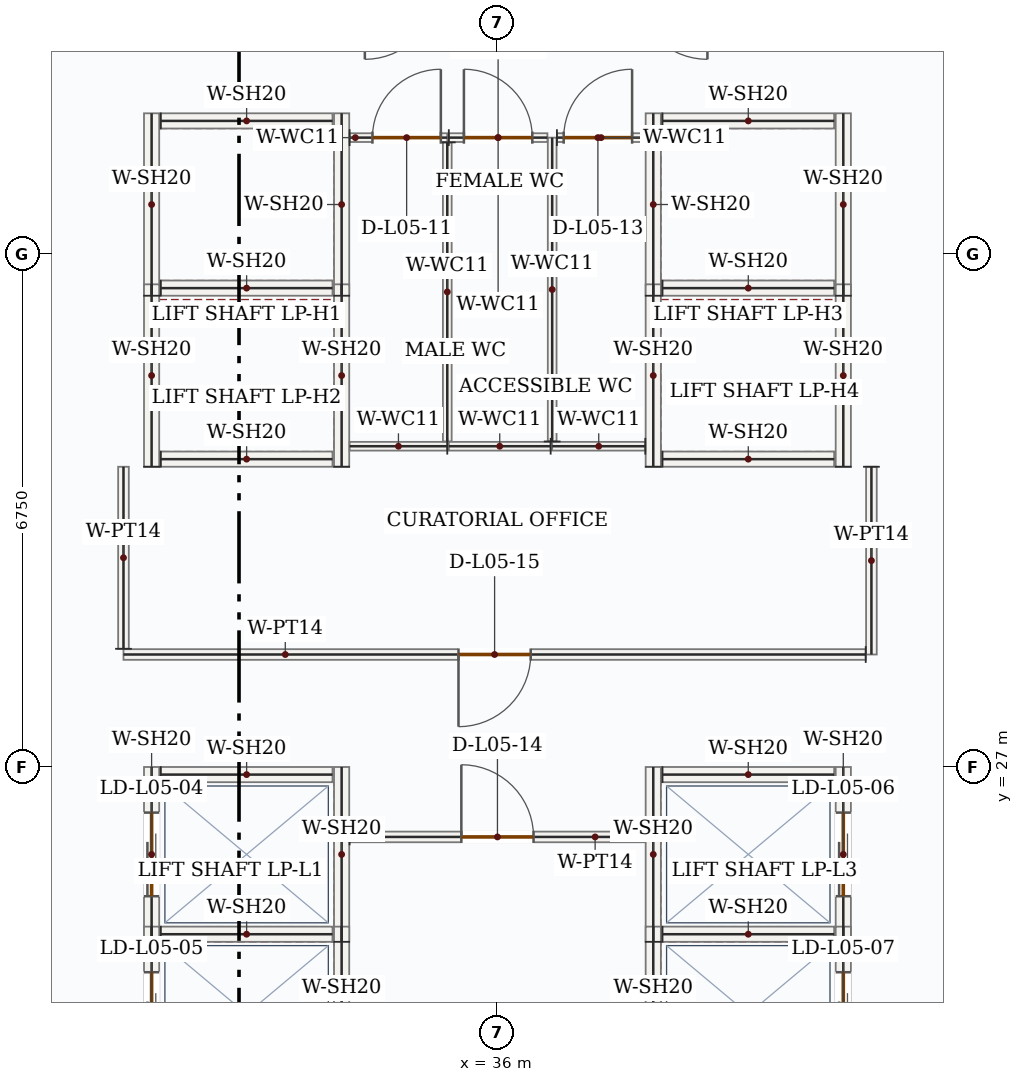
"""IFC4 building model, lengths in metres.
Left out: names, types, materials, properties, quantities, classifications, styles, units other than length and angle.
Written with IfcOpenShell. Run it as: python <this file> out.ifc"""

import sys

from ifc_helpers import new_model, si_unit, direction, frame, frame_2d, origin, place, context, subcontext, project, spatial, rectangle, extrude, source, transform, mapped, element, fill, save


model = new_model("IFC4")
c1 = context("Model", 3, precision=1e-05, world=origin(), true_north=direction((0.0, 1.0)))
c2 = subcontext(c1, "Body", "Model", "MODEL_VIEW")
j1 = project(units=[si_unit("LENGTHUNIT", "METRE"), si_unit("PLANEANGLEUNIT", "RADIAN")], contexts=[c1])
p1 = place(None, origin())
s1 = spatial("IfcSite", under=j1, at=p1, CompositionType="ELEMENT")
p2 = place(p1, origin())
s2 = spatial("IfcBuilding", under=s1, at=p2, CompositionType="ELEMENT")
p3 = place(p2, frame((0.0, 0.0, 29.1)))
s3 = spatial("IfcBuildingStorey", under=s2, at=p3, CompositionType="ELEMENT", Elevation=29.1)
m1 = source(origin(), c2, "Body", "SweptSolid", [
    extrude(rectangle(XDim=2.4, YDim=0.2, at=frame_2d((1.2, 0.0))), origin(), (0.0, 0.0, 1.0), 3.95),
])
for number, where, z_axis, x_axis in (
    (1, (31.45, 33.2, 0.0), (0.0, 0.0, 1.0), (0.0, 1.0, 0.0)),
    (2, (33.95, 33.2, 0.0), (0.0, 0.0, 1.0), (0.0, 1.0, 0.0)),
):
    element("IfcWall", number, at=place(p3, frame(where, z_axis=z_axis, x_axis=x_axis)), inside=s3, PredefinedType="SOLIDWALL", context=c2, shape_type="MappedRepresentation", body=[
        mapped(m1, transform((0.0, 0.0, 0.0), x_axis=(1.0, 0.0, 0.0), y_axis=(0.0, 1.0, 0.0), z_axis=(0.0, 0.0, 1.0), scale=1.0)),
    ])
m2 = source(origin(), c2, "Body", "SweptSolid", [
    extrude(rectangle(XDim=2.26, YDim=0.2, at=frame_2d((1.13, 0.0))), origin(), (0.0, 0.0, 1.0), 3.95),
])
for number, where, z_axis, x_axis in (
    (3, (31.57, 33.3, 0.0), (0.0, 0.0, 1.0), (1.0, 0.0, 0.0)),
    (4, (31.57, 35.5, 0.0), (0.0, 0.0, 1.0), (1.0, 0.0, 0.0)),
):
    element("IfcWall", number, at=place(p3, frame(where, z_axis=z_axis, x_axis=x_axis)), inside=s3, PredefinedType="SOLIDWALL", context=c2, shape_type="MappedRepresentation", body=[
        mapped(m2, transform((0.0, 0.0, 0.0), x_axis=(1.0, 0.0, 0.0), y_axis=(0.0, 1.0, 0.0), z_axis=(0.0, 0.0, 1.0), scale=1.0)),
    ])
for number, where, z_axis, x_axis in (
    (5, (31.45, 30.95, 0.0), (0.0, 0.0, 1.0), (0.0, 1.0, 0.0)),
    (6, (33.95, 30.95, 0.0), (0.0, 0.0, 1.0), (0.0, 1.0, 0.0)),
):
    element("IfcWall", number, at=place(p3, frame(where, z_axis=z_axis, x_axis=x_axis)), inside=s3, PredefinedType="SOLIDWALL", context=c2, shape_type="MappedRepresentation", body=[
        mapped(m1, transform((0.0, 0.0, 0.0), x_axis=(1.0, 0.0, 0.0), y_axis=(0.0, 1.0, 0.0), z_axis=(0.0, 0.0, 1.0), scale=1.0)),
    ])
p4 = place(p3, frame((31.57, 31.05, 0.0), z_axis=(0.0, 0.0, 1.0), x_axis=(1.0, 0.0, 0.0)))
e7 = element("IfcWall", 7, at=p4, inside=s3, PredefinedType="SOLIDWALL", context=c2, shape_type="MappedRepresentation", body=[
    mapped(m2, transform((0.0, 0.0, 0.0), x_axis=(1.0, 0.0, 0.0), y_axis=(0.0, 1.0, 0.0), z_axis=(0.0, 0.0, 1.0), scale=1.0)),
])
for number, where, z_axis, x_axis in (
    (8, (38.05, 33.2, 0.0), (0.0, 0.0, 1.0), (0.0, 1.0, 0.0)),
    (9, (40.55, 33.2, 0.0), (0.0, 0.0, 1.0), (0.0, 1.0, 0.0)),
):
    element("IfcWall", number, at=place(p3, frame(where, z_axis=z_axis, x_axis=x_axis)), inside=s3, PredefinedType="SOLIDWALL", context=c2, shape_type="MappedRepresentation", body=[
        mapped(m1, transform((0.0, 0.0, 0.0), x_axis=(1.0, 0.0, 0.0), y_axis=(0.0, 1.0, 0.0), z_axis=(0.0, 0.0, 1.0), scale=1.0)),
    ])
for number, where, z_axis, x_axis in (
    (10, (38.17, 33.3, 0.0), (0.0, 0.0, 1.0), (1.0, 0.0, 0.0)),
    (11, (38.17, 35.5, 0.0), (0.0, 0.0, 1.0), (1.0, 0.0, 0.0)),
):
    element("IfcWall", number, at=place(p3, frame(where, z_axis=z_axis, x_axis=x_axis)), inside=s3, PredefinedType="SOLIDWALL", context=c2, shape_type="MappedRepresentation", body=[
        mapped(m2, transform((0.0, 0.0, 0.0), x_axis=(1.0, 0.0, 0.0), y_axis=(0.0, 1.0, 0.0), z_axis=(0.0, 0.0, 1.0), scale=1.0)),
    ])
for number, where, z_axis, x_axis in (
    (12, (38.05, 30.95, 0.0), (0.0, 0.0, 1.0), (0.0, 1.0, 0.0)),
    (13, (40.55, 30.95, 0.0), (0.0, 0.0, 1.0), (0.0, 1.0, 0.0)),
):
    element("IfcWall", number, at=place(p3, frame(where, z_axis=z_axis, x_axis=x_axis)), inside=s3, PredefinedType="SOLIDWALL", context=c2, shape_type="MappedRepresentation", body=[
        mapped(m1, transform((0.0, 0.0, 0.0), x_axis=(1.0, 0.0, 0.0), y_axis=(0.0, 1.0, 0.0), z_axis=(0.0, 0.0, 1.0), scale=1.0)),
    ])
p5 = place(p3, frame((38.17, 31.05, 0.0), z_axis=(0.0, 0.0, 1.0), x_axis=(1.0, 0.0, 0.0)))
e14 = element("IfcWall", 14, at=p5, inside=s3, PredefinedType="SOLIDWALL", context=c2, shape_type="MappedRepresentation", body=[
    mapped(m2, transform((0.0, 0.0, 0.0), x_axis=(1.0, 0.0, 0.0), y_axis=(0.0, 1.0, 0.0), z_axis=(0.0, 0.0, 1.0), scale=1.0)),
])
p6 = place(p3, frame((31.45, 24.7, 0.0), z_axis=(0.0, 0.0, 1.0), x_axis=(0.0, 1.0, 0.0)))
e15 = element("IfcWall", 15, at=p6, inside=s3, PredefinedType="SOLIDWALL", context=c2, shape_type="SweptSolid", body=[
    extrude(rectangle(XDim=2.3, YDim=0.2, at=frame_2d((1.15, 0.0))), origin(), (0.0, 0.0, 1.0), 3.95),
])
p7 = place(p6, frame((0.6, 0.0, 0.0)))
e16 = element("IfcOpeningElement", 16, at=p7, cuts=e15, PredefinedType="OPENING", context=c2, shape_type="SweptSolid", body=[
    extrude(rectangle(XDim=1.1, YDim=2.15, at=frame_2d((0.55, 1.075))), frame((0.0, 0.11, 0.0), z_axis=(0.0, -1.0, 0.0), x_axis=(1.0, 0.0, 0.0)), (0.0, 0.0, 1.0), 0.22),
])
m3 = source(origin(), c2, "Body", "SweptSolid", [
    extrude(rectangle(XDim=2.3, YDim=0.2, at=frame_2d((1.15, 0.0))), origin(), (0.0, 0.0, 1.0), 3.95),
])
p8 = place(p3, frame((33.95, 24.7, 0.0), z_axis=(0.0, 0.0, 1.0), x_axis=(0.0, 1.0, 0.0)))
e17 = element("IfcWall", 17, at=p8, inside=s3, PredefinedType="SOLIDWALL", context=c2, shape_type="MappedRepresentation", body=[
    mapped(m3, transform((0.0, 0.0, 0.0), x_axis=(1.0, 0.0, 0.0), y_axis=(0.0, 1.0, 0.0), z_axis=(0.0, 0.0, 1.0), scale=1.0)),
])
for number, where, z_axis, x_axis in (
    (18, (31.57, 24.8, 0.0), (0.0, 0.0, 1.0), (1.0, 0.0, 0.0)),
    (19, (31.57, 26.9, 0.0), (0.0, 0.0, 1.0), (1.0, 0.0, 0.0)),
):
    element("IfcWall", number, at=place(p3, frame(where, z_axis=z_axis, x_axis=x_axis)), inside=s3, PredefinedType="SOLIDWALL", context=c2, shape_type="MappedRepresentation", body=[
        mapped(m2, transform((0.0, 0.0, 0.0), x_axis=(1.0, 0.0, 0.0), y_axis=(0.0, 1.0, 0.0), z_axis=(0.0, 0.0, 1.0), scale=1.0)),
    ])
p9 = place(p3, frame((31.45, 22.6, 0.0), z_axis=(0.0, 0.0, 1.0), x_axis=(0.0, 1.0, 0.0)))
e20 = element("IfcWall", 20, at=p9, inside=s3, PredefinedType="SOLIDWALL", context=c2, shape_type="SweptSolid", body=[
    extrude(rectangle(XDim=2.3, YDim=0.2, at=frame_2d((1.15, 0.0))), origin(), (0.0, 0.0, 1.0), 3.95),
])
p10 = place(p9, frame((0.6, 0.0, 0.0)))
e21 = element("IfcOpeningElement", 21, at=p10, cuts=e20, PredefinedType="OPENING", context=c2, shape_type="SweptSolid", body=[
    extrude(rectangle(XDim=1.1, YDim=2.15, at=frame_2d((0.55, 1.075))), frame((0.0, 0.11, 0.0), z_axis=(0.0, -1.0, 0.0), x_axis=(1.0, 0.0, 0.0)), (0.0, 0.0, 1.0), 0.22),
])
m4 = source(origin(), c2, "Body", "SweptSolid", [
    extrude(rectangle(XDim=2.3, YDim=0.2, at=frame_2d((1.15, 0.0))), origin(), (0.0, 0.0, 1.0), 3.95),
])
p11 = place(p3, frame((33.95, 22.6, 0.0), z_axis=(0.0, 0.0, 1.0), x_axis=(0.0, 1.0, 0.0)))
e22 = element("IfcWall", 22, at=p11, inside=s3, PredefinedType="SOLIDWALL", context=c2, shape_type="MappedRepresentation", body=[
    mapped(m4, transform((0.0, 0.0, 0.0), x_axis=(1.0, 0.0, 0.0), y_axis=(0.0, 1.0, 0.0), z_axis=(0.0, 0.0, 1.0), scale=1.0)),
])
p12 = place(p3, frame((38.05, 24.7, 0.0), z_axis=(0.0, 0.0, 1.0), x_axis=(0.0, 1.0, 0.0)))
e23 = element("IfcWall", 23, at=p12, inside=s3, PredefinedType="SOLIDWALL", context=c2, shape_type="MappedRepresentation", body=[
    mapped(m3, transform((0.0, 0.0, 0.0), x_axis=(1.0, 0.0, 0.0), y_axis=(0.0, 1.0, 0.0), z_axis=(0.0, 0.0, 1.0), scale=1.0)),
])
p13 = place(p3, frame((40.55, 24.7, 0.0), z_axis=(0.0, 0.0, 1.0), x_axis=(0.0, 1.0, 0.0)))
e24 = element("IfcWall", 24, at=p13, inside=s3, PredefinedType="SOLIDWALL", context=c2, shape_type="SweptSolid", body=[
    extrude(rectangle(XDim=2.3, YDim=0.2, at=frame_2d((1.15, 0.0))), origin(), (0.0, 0.0, 1.0), 3.95),
])
p14 = place(p13, frame((0.6, 0.0, 0.0)))
e25 = element("IfcOpeningElement", 25, at=p14, cuts=e24, PredefinedType="OPENING", context=c2, shape_type="SweptSolid", body=[
    extrude(rectangle(XDim=1.1, YDim=2.15, at=frame_2d((0.55, 1.075))), frame((0.0, 0.11, 0.0), z_axis=(0.0, -1.0, 0.0), x_axis=(1.0, 0.0, 0.0)), (0.0, 0.0, 1.0), 0.22),
])
for number, where, z_axis, x_axis in (
    (26, (38.17, 24.8, 0.0), (0.0, 0.0, 1.0), (1.0, 0.0, 0.0)),
    (27, (38.17, 26.9, 0.0), (0.0, 0.0, 1.0), (1.0, 0.0, 0.0)),
):
    element("IfcWall", number, at=place(p3, frame(where, z_axis=z_axis, x_axis=x_axis)), inside=s3, PredefinedType="SOLIDWALL", context=c2, shape_type="MappedRepresentation", body=[
        mapped(m2, transform((0.0, 0.0, 0.0), x_axis=(1.0, 0.0, 0.0), y_axis=(0.0, 1.0, 0.0), z_axis=(0.0, 0.0, 1.0), scale=1.0)),
    ])
p15 = place(p3, frame((38.05, 22.6, 0.0), z_axis=(0.0, 0.0, 1.0), x_axis=(0.0, 1.0, 0.0)))
e28 = element("IfcWall", 28, at=p15, inside=s3, PredefinedType="SOLIDWALL", context=c2, shape_type="MappedRepresentation", body=[
    mapped(m4, transform((0.0, 0.0, 0.0), x_axis=(1.0, 0.0, 0.0), y_axis=(0.0, 1.0, 0.0), z_axis=(0.0, 0.0, 1.0), scale=1.0)),
])
p16 = place(p3, frame((40.55, 22.6, 0.0), z_axis=(0.0, 0.0, 1.0), x_axis=(0.0, 1.0, 0.0)))
e29 = element("IfcWall", 29, at=p16, inside=s3, PredefinedType="SOLIDWALL", context=c2, shape_type="SweptSolid", body=[
    extrude(rectangle(XDim=2.3, YDim=0.2, at=frame_2d((1.15, 0.0))), origin(), (0.0, 0.0, 1.0), 3.95),
])
p17 = place(p16, frame((0.6, 0.0, 0.0)))
e30 = element("IfcOpeningElement", 30, at=p17, cuts=e29, PredefinedType="OPENING", context=c2, shape_type="SweptSolid", body=[
    extrude(rectangle(XDim=1.1, YDim=2.15, at=frame_2d((0.55, 1.075))), frame((0.0, 0.11, 0.0), z_axis=(0.0, -1.0, 0.0), x_axis=(1.0, 0.0, 0.0)), (0.0, 0.0, 1.0), 0.22),
])
m5 = source(origin(), c2, "Body", "SweptSolid", [
    extrude(rectangle(XDim=1.225, YDim=0.115, at=frame_2d((0.613, 0.0))), origin(), (0.0, 0.0, 1.0), 3.95),
])
p18 = place(p3, frame((37.945, 31.22, 0.0), z_axis=(0.0, 0.0, 1.0), x_axis=(-1.0, 0.0, 0.0)))
e31 = element("IfcWall", 31, at=p18, inside=s3, PredefinedType="PARTITIONING", context=c2, shape_type="MappedRepresentation", body=[
    mapped(m5, transform((0.0, 0.0, 0.0), x_axis=(1.0, 0.0, 0.0), y_axis=(0.0, 1.0, 0.0), z_axis=(0.0, 0.0, 1.0), scale=1.0)),
])
m6 = source(origin(), c2, "Body", "SweptSolid", [
    extrude(rectangle(XDim=3.998, YDim=0.115, at=frame_2d((1.999, 0.0))), origin(), (0.0, 0.0, 1.0), 3.95),
])
p19 = place(p3, frame((36.72, 31.282, 0.0), z_axis=(0.0, 0.0, 1.0), x_axis=(0.0, 1.0, 0.0)))
e32 = element("IfcWall", 32, at=p19, inside=s3, PredefinedType="PARTITIONING", context=c2, shape_type="MappedRepresentation", body=[
    mapped(m6, transform((0.0, 0.0, 0.0), x_axis=(1.0, 0.0, 0.0), y_axis=(0.0, 1.0, 0.0), z_axis=(0.0, 0.0, 1.0), scale=1.0)),
])
p20 = place(p3, frame((36.782, 35.28, 0.0), z_axis=(0.0, 0.0, 1.0), x_axis=(1.0, 0.0, 0.0)))
e33 = element("IfcWall", 33, at=p20, inside=s3, PredefinedType="PARTITIONING", context=c2, shape_type="SweptSolid", body=[
    extrude(rectangle(XDim=1.163, YDim=0.115, at=frame_2d((0.581, 0.0))), origin(), (0.0, 0.0, 1.0), 3.95),
])
p21 = place(p20, frame((0.089, 0.0, 0.0)))
e34 = element("IfcOpeningElement", 34, at=p21, cuts=e33, PredefinedType="OPENING", context=c2, shape_type="SweptSolid", body=[
    extrude(rectangle(XDim=0.9, YDim=2.1, at=frame_2d((0.45, 1.05))), frame((0.0, 0.067, 0.0), z_axis=(0.0, -1.0, 0.0), x_axis=(1.0, 0.0, 0.0)), (0.0, 0.0, 1.0), 0.135),
])
m7 = source(origin(), c2, "Body", "SweptSolid", [
    extrude(rectangle(XDim=1.285, YDim=0.115, at=frame_2d((0.643, 0.0))), origin(), (0.0, 0.0, 1.0), 3.95),
])
p22 = place(p3, frame((35.34, 31.22, 0.0), z_axis=(0.0, 0.0, 1.0), x_axis=(-1.0, 0.0, 0.0)))
e35 = element("IfcWall", 35, at=p22, inside=s3, PredefinedType="PARTITIONING", context=c2, shape_type="MappedRepresentation", body=[
    mapped(m7, transform((0.0, 0.0, 0.0), x_axis=(1.0, 0.0, 0.0), y_axis=(0.0, 1.0, 0.0), z_axis=(0.0, 0.0, 1.0), scale=1.0)),
])
p23 = place(p3, frame((34.055, 35.28, 0.0), z_axis=(0.0, 0.0, 1.0), x_axis=(1.0, 0.0, 0.0)))
e36 = element("IfcWall", 36, at=p23, inside=s3, PredefinedType="PARTITIONING", context=c2, shape_type="SweptSolid", body=[
    extrude(rectangle(XDim=1.285, YDim=0.115, at=frame_2d((0.643, 0.0))), origin(), (0.0, 0.0, 1.0), 3.95),
])
p24 = place(p23, frame((0.3, 0.0, 0.0)))
e37 = element("IfcOpeningElement", 37, at=p24, cuts=e36, PredefinedType="OPENING", context=c2, shape_type="SweptSolid", body=[
    extrude(rectangle(XDim=0.9, YDim=2.1, at=frame_2d((0.45, 1.05))), frame((0.0, 0.067, 0.0), z_axis=(0.0, -1.0, 0.0), x_axis=(1.0, 0.0, 0.0)), (0.0, 0.0, 1.0), 0.135),
])
m8 = source(origin(), c2, "Body", "SweptSolid", [
    extrude(rectangle(XDim=3.935, YDim=0.115, at=frame_2d((1.968, 0.0))), origin(), (0.0, 0.0, 1.0), 3.95),
])
p25 = place(p3, frame((35.34, 35.218, 0.0), z_axis=(0.0, 0.0, 1.0), x_axis=(0.0, -1.0, 0.0)))
e38 = element("IfcWall", 38, at=p25, inside=s3, PredefinedType="PARTITIONING", context=c2, shape_type="MappedRepresentation", body=[
    mapped(m8, transform((0.0, 0.0, 0.0), x_axis=(1.0, 0.0, 0.0), y_axis=(0.0, 1.0, 0.0), z_axis=(0.0, 0.0, 1.0), scale=1.0)),
])
m9 = source(origin(), c2, "Body", "SweptSolid", [
    extrude(rectangle(XDim=1.34, YDim=0.115, at=frame_2d((0.67, 0.0))), origin(), (0.0, 0.0, 1.0), 3.95),
])
p26 = place(p3, frame((36.7, 31.22, 0.0), z_axis=(0.0, 0.0, 1.0), x_axis=(-1.0, 0.0, 0.0)))
e39 = element("IfcWall", 39, at=p26, inside=s3, PredefinedType="PARTITIONING", context=c2, shape_type="MappedRepresentation", body=[
    mapped(m9, transform((0.0, 0.0, 0.0), x_axis=(1.0, 0.0, 0.0), y_axis=(0.0, 1.0, 0.0), z_axis=(0.0, 0.0, 1.0), scale=1.0)),
])
p27 = place(p3, frame((35.36, 35.28, 0.0), z_axis=(0.0, 0.0, 1.0), x_axis=(1.0, 0.0, 0.0)))
e40 = element("IfcWall", 40, at=p27, inside=s3, PredefinedType="PARTITIONING", context=c2, shape_type="SweptSolid", body=[
    extrude(rectangle(XDim=1.297, YDim=0.115, at=frame_2d((0.649, 0.0))), origin(), (0.0, 0.0, 1.0), 3.95),
])
p28 = place(p27, frame((0.199, 0.0, 0.0)))
e41 = element("IfcOpeningElement", 41, at=p28, cuts=e40, PredefinedType="OPENING", context=c2, shape_type="SweptSolid", body=[
    extrude(rectangle(XDim=0.9, YDim=2.1, at=frame_2d((0.45, 1.05))), frame((0.0, 0.067, 0.0), z_axis=(0.0, -1.0, 0.0), x_axis=(1.0, 0.0, 0.0)), (0.0, 0.0, 1.0), 0.135),
])
p29 = place(p3, frame((34.055, 26.08, 0.0), z_axis=(0.0, 0.0, 1.0), x_axis=(1.0, 0.0, 0.0)))
e42 = element("IfcWall", 42, at=p29, inside=s3, PredefinedType="PARTITIONING", context=c2, shape_type="SweptSolid", body=[
    extrude(rectangle(XDim=3.89, YDim=0.14, at=frame_2d((1.945, 0.0))), origin(), (0.0, 0.0, 1.0), 3.95),
])
p30 = place(p29, frame((1.47, 0.0, 0.0)))
e43 = element("IfcOpeningElement", 43, at=p30, cuts=e42, PredefinedType="OPENING", context=c2, shape_type="SweptSolid", body=[
    extrude(rectangle(XDim=0.95, YDim=2.15, at=frame_2d((0.475, 1.075))), frame((0.0, 0.08, 0.0), z_axis=(0.0, -1.0, 0.0), x_axis=(1.0, 0.0, 0.0)), (0.0, 0.0, 1.0), 0.16),
])
m10 = source(origin(), c2, "Body", "SweptSolid", [
    extrude(rectangle(XDim=2.47, YDim=0.14, at=frame_2d((1.235, 0.0))), origin(), (0.0, 0.0, 1.0), 3.95),
])
p31 = place(p3, frame((40.92, 30.95, 0.0), z_axis=(0.0, 0.0, 1.0), x_axis=(0.0, -1.0, 0.0)))
e44 = element("IfcWall", 44, at=p31, inside=s3, PredefinedType="PARTITIONING", context=c2, shape_type="MappedRepresentation", body=[
    mapped(m10, transform((0.0, 0.0, 0.0), x_axis=(1.0, 0.0, 0.0), y_axis=(0.0, 1.0, 0.0), z_axis=(0.0, 0.0, 1.0), scale=1.0)),
])
p32 = place(p3, frame((40.845, 28.48, 0.0), z_axis=(0.0, 0.0, 1.0), x_axis=(-1.0, 0.0, 0.0)))
e45 = element("IfcWall", 45, at=p32, inside=s3, PredefinedType="PARTITIONING", context=c2, shape_type="SweptSolid", body=[
    extrude(rectangle(XDim=9.765, YDim=0.14, at=frame_2d((4.882, 0.0))), origin(), (0.0, 0.0, 1.0), 3.95),
])
p33 = place(p32, frame((4.407, 0.0, 0.0)))
e46 = element("IfcOpeningElement", 46, at=p33, cuts=e45, PredefinedType="OPENING", context=c2, shape_type="SweptSolid", body=[
    extrude(rectangle(XDim=0.95, YDim=2.15, at=frame_2d((0.475, 1.075))), frame((0.0, 0.08, 0.0), z_axis=(0.0, -1.0, 0.0), x_axis=(1.0, 0.0, 0.0)), (0.0, 0.0, 1.0), 0.16),
])
m11 = source(origin(), c2, "Body", "SweptSolid", [
    extrude(rectangle(XDim=2.395, YDim=0.14, at=frame_2d((1.198, 0.0))), origin(), (0.0, 0.0, 1.0), 3.95),
])
p34 = place(p3, frame((31.08, 28.555, 0.0), z_axis=(0.0, 0.0, 1.0), x_axis=(0.0, 1.0, 0.0)))
e47 = element("IfcWall", 47, at=p34, inside=s3, PredefinedType="PARTITIONING", context=c2, shape_type="MappedRepresentation", body=[
    mapped(m11, transform((0.0, 0.0, 0.0), x_axis=(1.0, 0.0, 0.0), y_axis=(0.0, 1.0, 0.0), z_axis=(0.0, 0.0, 1.0), scale=1.0)),
])
m12 = source(origin(), c2, "Body", "SweptSolid", [
    extrude(rectangle(XDim=1.1, YDim=2.15, at=frame_2d((0.55, 1.075))), frame((0.0, 0.025, 0.0), z_axis=(0.0, -1.0, 0.0), x_axis=(1.0, 0.0, 0.0)), (0.0, 0.0, 1.0), 0.05),
])
p35 = place(p7, origin())
e48 = element("IfcDoor", 48, at=p35, inside=s3, OperationType="DOUBLE_DOOR_SLIDING", PredefinedType="DOOR", context=c2, shape_type="MappedRepresentation", body=[
    mapped(m12, transform((0.0, 0.0, 0.0), x_axis=(1.0, 0.0, 0.0), y_axis=(0.0, 1.0, 0.0), z_axis=(0.0, 0.0, 1.0), scale=1.0)),
])
fill(e16, e48)
p36 = place(p10, origin())
e49 = element("IfcDoor", 49, at=p36, inside=s3, OperationType="DOUBLE_DOOR_SLIDING", PredefinedType="DOOR", context=c2, shape_type="MappedRepresentation", body=[
    mapped(m12, transform((0.0, 0.0, 0.0), x_axis=(1.0, 0.0, 0.0), y_axis=(0.0, 1.0, 0.0), z_axis=(0.0, 0.0, 1.0), scale=1.0)),
])
fill(e21, e49)
p37 = place(p14, origin())
e50 = element("IfcDoor", 50, at=p37, inside=s3, OperationType="DOUBLE_DOOR_SLIDING", PredefinedType="DOOR", context=c2, shape_type="MappedRepresentation", body=[
    mapped(m12, transform((0.0, 0.0, 0.0), x_axis=(1.0, 0.0, 0.0), y_axis=(0.0, 1.0, 0.0), z_axis=(0.0, 0.0, 1.0), scale=1.0)),
])
fill(e25, e50)
p38 = place(p17, origin())
e51 = element("IfcDoor", 51, at=p38, inside=s3, OperationType="DOUBLE_DOOR_SLIDING", PredefinedType="DOOR", context=c2, shape_type="MappedRepresentation", body=[
    mapped(m12, transform((0.0, 0.0, 0.0), x_axis=(1.0, 0.0, 0.0), y_axis=(0.0, 1.0, 0.0), z_axis=(0.0, 0.0, 1.0), scale=1.0)),
])
fill(e30, e51)
m13 = source(origin(), c2, "Body", "SweptSolid", [
    extrude(rectangle(XDim=0.9, YDim=2.1, at=frame_2d((0.45, 1.05))), frame((0.0, 0.025, 0.0), z_axis=(0.0, -1.0, 0.0), x_axis=(1.0, 0.0, 0.0)), (0.0, 0.0, 1.0), 0.05),
])
p39 = place(p24, origin())
e52 = element("IfcDoor", 52, at=p39, inside=s3, OperationType="SINGLE_SWING_RIGHT", PredefinedType="DOOR", context=c2, shape_type="MappedRepresentation", body=[
    mapped(m13, transform((0.0, 0.0, 0.0), x_axis=(1.0, 0.0, 0.0), y_axis=(0.0, 1.0, 0.0), z_axis=(0.0, 0.0, 1.0), scale=1.0)),
])
fill(e37, e52)
p40 = place(p28, origin())
e53 = element("IfcDoor", 53, at=p40, inside=s3, OperationType="SINGLE_SWING_LEFT", PredefinedType="DOOR", context=c2, shape_type="MappedRepresentation", body=[
    mapped(m13, transform((0.0, 0.0, 0.0), x_axis=(1.0, 0.0, 0.0), y_axis=(0.0, 1.0, 0.0), z_axis=(0.0, 0.0, 1.0), scale=1.0)),
])
fill(e41, e53)
p41 = place(p21, origin())
e54 = element("IfcDoor", 54, at=p41, inside=s3, OperationType="SINGLE_SWING_RIGHT", PredefinedType="DOOR", context=c2, shape_type="MappedRepresentation", body=[
    mapped(m13, transform((0.0, 0.0, 0.0), x_axis=(1.0, 0.0, 0.0), y_axis=(0.0, 1.0, 0.0), z_axis=(0.0, 0.0, 1.0), scale=1.0)),
])
fill(e34, e54)
m14 = source(origin(), c2, "Body", "SweptSolid", [
    extrude(rectangle(XDim=0.95, YDim=2.15, at=frame_2d((0.475, 1.075))), frame((0.0, 0.025, 0.0), z_axis=(0.0, -1.0, 0.0), x_axis=(1.0, 0.0, 0.0)), (0.0, 0.0, 1.0), 0.05),
])
p42 = place(p30, origin())
e55 = element("IfcDoor", 55, at=p42, inside=s3, OperationType="SINGLE_SWING_LEFT", PredefinedType="DOOR", context=c2, shape_type="MappedRepresentation", body=[
    mapped(m14, transform((0.0, 0.0, 0.0), x_axis=(1.0, 0.0, 0.0), y_axis=(0.0, 1.0, 0.0), z_axis=(0.0, 0.0, 1.0), scale=1.0)),
])
fill(e43, e55)
p43 = place(p33, origin())
e56 = element("IfcDoor", 56, at=p43, inside=s3, OperationType="SINGLE_SWING_RIGHT", PredefinedType="DOOR", context=c2, shape_type="MappedRepresentation", body=[
    mapped(m14, transform((0.0, 0.0, 0.0), x_axis=(1.0, 0.0, 0.0), y_axis=(0.0, 1.0, 0.0), z_axis=(0.0, 0.0, 1.0), scale=1.0)),
])
fill(e46, e56)
save(model, sys.argv[1])
